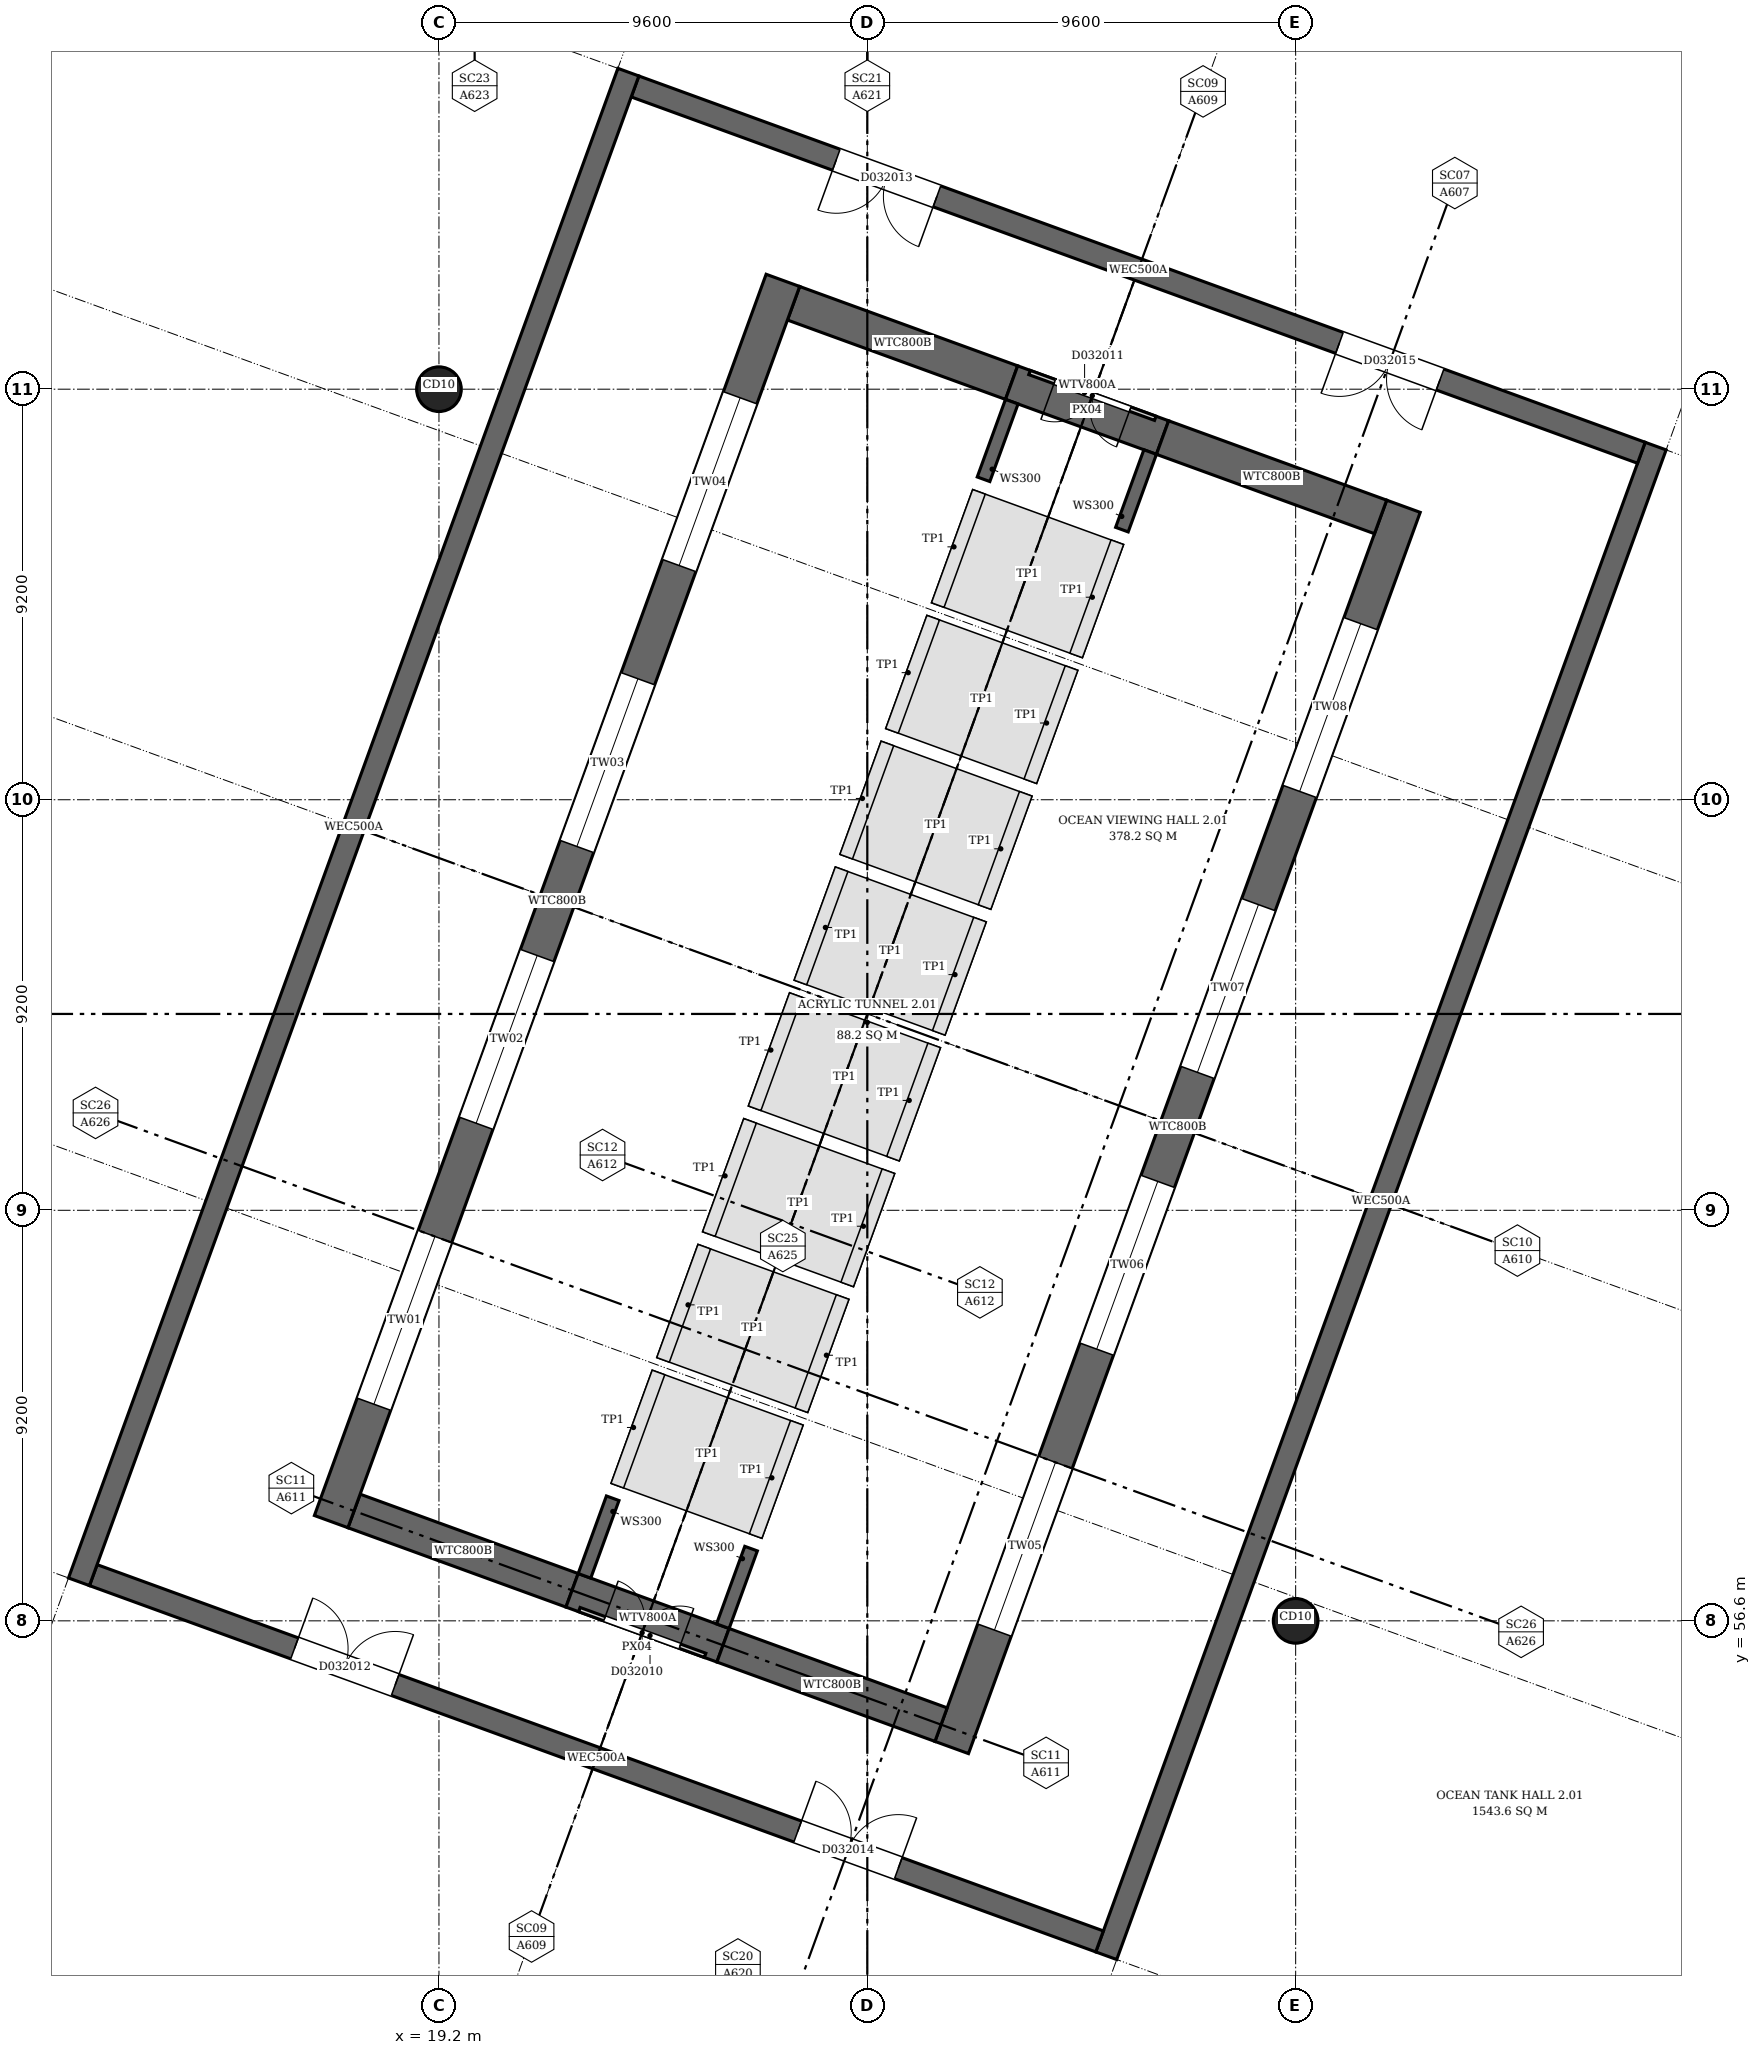
"""IFC4 building model, lengths in metres.
Left out: names, types, materials, properties, quantities, classifications, styles, units other than length and angle.
Written with IfcOpenShell. Run it as: python <this file> out.ifc"""

import sys

from ifc_helpers import new_model, si_unit, direction, frame, frame_2d, origin, origin_2d, place, context, subcontext, project, spatial, rectangle, circle, extrude, element, fill, save


model = new_model("IFC4")
c1 = context("Model", 3, precision=1e-05, world=origin(), true_north=direction((0.0, 1.0)))
c2 = subcontext(c1, "Body", "Model", "MODEL_VIEW")
j1 = project(units=[si_unit("LENGTHUNIT", "METRE"), si_unit("PLANEANGLEUNIT", "RADIAN")], contexts=[c1])
p1 = place(None, origin())
s1 = spatial("IfcSite", under=j1, at=p1, CompositionType="ELEMENT")
p2 = place(p1, origin())
s2 = spatial("IfcBuilding", under=s1, at=p2, CompositionType="ELEMENT")
p3 = place(p2, frame((0.0, 0.0, 14.2)))
s3 = spatial("IfcBuildingStorey", under=s2, at=p3, CompositionType="ELEMENT", Elevation=14.2)
p4 = place(p3, frame((11.132, 57.475, 0.0), z_axis=(0.0, 0.0, 1.0), x_axis=(0.342021295667, 0.939692201367, 0.0)))
e1 = element("IfcWall", 1, at=p4, inside=s3, PredefinedType="SHEAR", context=c2, shape_type="SweptSolid", body=[
    extrude(rectangle(XDim=36.0, YDim=0.5, at=frame_2d((18.0, 0.0))), origin(), (0.0, 0.0, 1.0), 7.5),
])
p5 = place(p3, frame((34.155, 49.096, 0.0), z_axis=(0.0, 0.0, 1.0), x_axis=(0.342019116079, 0.939692994673, 0.0)))
e2 = element("IfcWall", 2, at=p5, inside=s3, PredefinedType="SHEAR", context=c2, shape_type="SweptSolid", body=[
    extrude(rectangle(XDim=36.0, YDim=0.5, at=frame_2d((18.0, 0.0))), origin(), (0.0, 0.0, 1.0), 7.5),
])
p6 = place(p3, frame((11.453, 57.625, 0.0), z_axis=(0.0, 0.0, 1.0), x_axis=(0.939691804709, -0.342022385471, 0.0)))
e3 = element("IfcWall", 3, at=p6, inside=s3, PredefinedType="SHEAR", context=c2, shape_type="SweptSolid", body=[
    extrude(rectangle(XDim=24.0, YDim=0.5, at=frame_2d((12.0, 0.0))), origin(), (0.0, 0.0, 1.0), 7.5),
])
p7 = place(p6, frame((4.8, 0.0, 0.0)))
e4 = element("IfcOpeningElement", 4, at=p7, cuts=e3, PredefinedType="OPENING", context=c2, shape_type="SweptSolid", body=[
    extrude(rectangle(XDim=2.4, YDim=2.4, at=frame_2d((1.2, 1.2))), frame((0.0, 0.26, 0.0), z_axis=(0.0, -1.0, 0.0), x_axis=(1.0, 0.0, 0.0)), (0.0, 0.0, 1.0), 0.52),
])
p8 = place(p6, frame((16.8, 0.0, 0.0)))
e5 = element("IfcOpeningElement", 5, at=p8, cuts=e3, PredefinedType="OPENING", context=c2, shape_type="SweptSolid", body=[
    extrude(rectangle(XDim=2.4, YDim=2.4, at=frame_2d((1.2, 1.2))), frame((0.0, 0.26, 0.0), z_axis=(0.0, -1.0, 0.0), x_axis=(1.0, 0.0, 0.0)), (0.0, 0.0, 1.0), 0.52),
])
p9 = place(p3, frame((23.594, 90.984, 0.0), z_axis=(0.0, 0.0, 1.0), x_axis=(0.939692994673, -0.342019116079, 0.0)))
e6 = element("IfcWall", 6, at=p9, inside=s3, PredefinedType="SHEAR", context=c2, shape_type="SweptSolid", body=[
    extrude(rectangle(XDim=24.0, YDim=0.5, at=frame_2d((12.0, 0.0))), origin(), (0.0, 0.0, 1.0), 7.5),
])
p10 = place(p9, frame((4.8, 0.0, 0.0)))
e7 = element("IfcOpeningElement", 7, at=p10, cuts=e6, PredefinedType="OPENING", context=c2, shape_type="SweptSolid", body=[
    extrude(rectangle(XDim=2.4, YDim=2.4, at=frame_2d((1.2, 1.2))), frame((0.0, 0.26, 0.0), z_axis=(0.0, -1.0, 0.0), x_axis=(1.0, 0.0, 0.0)), (0.0, 0.0, 1.0), 0.52),
])
p11 = place(p9, frame((16.8, 0.0, 0.0)))
e8 = element("IfcOpeningElement", 8, at=p11, cuts=e6, PredefinedType="OPENING", context=c2, shape_type="SweptSolid", body=[
    extrude(rectangle(XDim=2.4, YDim=2.4, at=frame_2d((1.2, 1.2))), frame((0.0, 0.26, 0.0), z_axis=(0.0, -1.0, 0.0), x_axis=(1.0, 0.0, 0.0)), (0.0, 0.0, 1.0), 0.52),
])
p12 = place(p3, frame((16.784, 58.823, 0.0), z_axis=(0.0, 0.0, 1.0), x_axis=(0.342019205328, 0.939692962188, 0.0)))
e9 = element("IfcWall", 9, at=p12, inside=s3, PredefinedType="SOLIDWALL", context=c2, shape_type="SweptSolid", body=[
    extrude(rectangle(XDim=29.6, YDim=0.8, at=frame_2d((14.8, 0.0))), origin(), (0.0, 0.0, 1.0), 7.5),
])
p13 = place(p12, frame((2.8, 0.0, 0.6)))
e10 = element("IfcOpeningElement", 10, at=p13, cuts=e9, PredefinedType="OPENING", context=c2, shape_type="SweptSolid", body=[
    extrude(rectangle(XDim=4.0, YDim=3.0, at=frame_2d((2.0, 1.5))), frame((0.0, 0.41, 0.0), z_axis=(0.0, -1.0, 0.0), x_axis=(1.0, 0.0, 0.0)), (0.0, 0.0, 1.0), 0.82),
])
p14 = place(p12, frame((9.5, 0.0, 0.6)))
e11 = element("IfcOpeningElement", 11, at=p14, cuts=e9, PredefinedType="OPENING", context=c2, shape_type="SweptSolid", body=[
    extrude(rectangle(XDim=4.0, YDim=3.0, at=frame_2d((2.0, 1.5))), frame((0.0, 0.41, 0.0), z_axis=(0.0, -1.0, 0.0), x_axis=(1.0, 0.0, 0.0)), (0.0, 0.0, 1.0), 0.82),
])
p15 = place(p12, frame((16.1, 0.0, 0.6)))
e12 = element("IfcOpeningElement", 12, at=p15, cuts=e9, PredefinedType="OPENING", context=c2, shape_type="SweptSolid", body=[
    extrude(rectangle(XDim=4.0, YDim=3.0, at=frame_2d((2.0, 1.5))), frame((0.0, 0.41, 0.0), z_axis=(0.0, -1.0, 0.0), x_axis=(1.0, 0.0, 0.0)), (0.0, 0.0, 1.0), 0.82),
])
p16 = place(p12, frame((22.8, 0.0, 0.6)))
e13 = element("IfcOpeningElement", 13, at=p16, cuts=e9, PredefinedType="OPENING", context=c2, shape_type="SweptSolid", body=[
    extrude(rectangle(XDim=4.0, YDim=3.0, at=frame_2d((2.0, 1.5))), frame((0.0, 0.41, 0.0), z_axis=(0.0, -1.0, 0.0), x_axis=(1.0, 0.0, 0.0)), (0.0, 0.0, 1.0), 0.82),
])
p17 = place(p3, frame((30.692, 53.762, 0.0), z_axis=(0.0, 0.0, 1.0), x_axis=(0.342021856193, 0.939691997352, 0.0)))
e14 = element("IfcWall", 14, at=p17, inside=s3, PredefinedType="SOLIDWALL", context=c2, shape_type="SweptSolid", body=[
    extrude(rectangle(XDim=29.6, YDim=0.8, at=frame_2d((14.8, 0.0))), origin(), (0.0, 0.0, 1.0), 7.5),
])
p18 = place(p17, frame((2.8, 0.0, 0.6)))
e15 = element("IfcOpeningElement", 15, at=p18, cuts=e14, PredefinedType="OPENING", context=c2, shape_type="SweptSolid", body=[
    extrude(rectangle(XDim=4.0, YDim=3.0, at=frame_2d((2.0, 1.5))), frame((0.0, 0.41, 0.0), z_axis=(0.0, -1.0, 0.0), x_axis=(1.0, 0.0, 0.0)), (0.0, 0.0, 1.0), 0.82),
])
p19 = place(p17, frame((9.5, 0.0, 0.6)))
e16 = element("IfcOpeningElement", 16, at=p19, cuts=e14, PredefinedType="OPENING", context=c2, shape_type="SweptSolid", body=[
    extrude(rectangle(XDim=4.0, YDim=3.0, at=frame_2d((2.0, 1.5))), frame((0.0, 0.41, 0.0), z_axis=(0.0, -1.0, 0.0), x_axis=(1.0, 0.0, 0.0)), (0.0, 0.0, 1.0), 0.82),
])
p20 = place(p17, frame((16.1, 0.0, 0.6)))
e17 = element("IfcOpeningElement", 17, at=p20, cuts=e14, PredefinedType="OPENING", context=c2, shape_type="SweptSolid", body=[
    extrude(rectangle(XDim=4.0, YDim=3.0, at=frame_2d((2.0, 1.5))), frame((0.0, 0.41, 0.0), z_axis=(0.0, -1.0, 0.0), x_axis=(1.0, 0.0, 0.0)), (0.0, 0.0, 1.0), 0.82),
])
p21 = place(p17, frame((22.8, 0.0, 0.6)))
e18 = element("IfcOpeningElement", 18, at=p21, cuts=e14, PredefinedType="OPENING", context=c2, shape_type="SweptSolid", body=[
    extrude(rectangle(XDim=4.0, YDim=3.0, at=frame_2d((2.0, 1.5))), frame((0.0, 0.41, 0.0), z_axis=(0.0, -1.0, 0.0), x_axis=(1.0, 0.0, 0.0)), (0.0, 0.0, 1.0), 0.82),
])
p22 = place(p3, frame((17.297, 59.062, 0.0), z_axis=(0.0, 0.0, 1.0), x_axis=(0.939700169674, -0.341999402214, 0.0)))
e19 = element("IfcWall", 19, at=p22, inside=s3, PredefinedType="SOLIDWALL", context=c2, shape_type="SweptSolid", body=[
    extrude(rectangle(XDim=5.2, YDim=0.8, at=frame_2d((2.6, 0.0))), origin(), (0.0, 0.0, 1.0), 7.5),
])
p23 = place(p3, frame((25.566, 56.053, 0.0), z_axis=(0.0, 0.0, 1.0), x_axis=(0.939685079668, -0.342040861666, 0.0)))
e20 = element("IfcWall", 20, at=p23, inside=s3, PredefinedType="SOLIDWALL", context=c2, shape_type="SweptSolid", body=[
    extrude(rectangle(XDim=5.2, YDim=0.8, at=frame_2d((2.6, 0.0))), origin(), (0.0, 0.0, 1.0), 7.5),
])
p24 = place(p3, frame((22.183, 57.284, 2.9), z_axis=(0.0, 0.0, 1.0), x_axis=(0.93968249756, -0.342047955379, 0.0)))
e21 = element("IfcWall", 21, at=p24, inside=s3, PredefinedType="SOLIDWALL", context=c2, shape_type="SweptSolid", body=[
    extrude(rectangle(XDim=3.6, YDim=0.8, at=frame_2d((1.8, 0.0))), origin(), (0.0, 0.0, 1.0), 4.6),
])
for number, where, z_axis, x_axis in (
    (22, (27.147, 86.126, 0.0), (0.0, 0.0, 1.0), (0.94, -0.342, 0.0)),
    (23, (35.417, 83.116, 0.0), (0.0, 0.0, 1.0), (0.94, -0.342, 0.0)),
):
    element("IfcWall", number, at=place(p3, frame(where, z_axis=z_axis, x_axis=x_axis)), inside=s3, PredefinedType="SOLIDWALL", context=c2, shape_type="SweptSolid", body=[
        extrude(rectangle(XDim=5.2, YDim=0.8, at=frame_2d((2.6, 0.0))), origin(), (0.0, 0.0, 1.0), 7.5),
    ])
p25 = place(p3, frame((32.034, 84.347, 2.9), z_axis=(0.0, 0.0, 1.0), x_axis=(0.939696360271, -0.342009868999, 0.0)))
e24 = element("IfcWall", 24, at=p25, inside=s3, PredefinedType="SOLIDWALL", context=c2, shape_type="SweptSolid", body=[
    extrude(rectangle(XDim=3.6, YDim=0.8, at=frame_2d((1.8, 0.0))), origin(), (0.0, 0.0, 1.0), 4.6),
])
for number, where, z_axis, x_axis in (
    (25, (38.4, 56.6, 0.0), (0.0, 0.0, 1.0), (1.0, 0.0, 0.0)),
    (26, (19.2, 84.2, 0.0), (0.0, 0.0, 1.0), (1.0, 0.0, 0.0)),
):
    element("IfcColumn", number, at=place(p3, frame(where, z_axis=z_axis, x_axis=x_axis)), inside=s3, PredefinedType="COLUMN", context=c2, shape_type="SweptSolid", body=[
        extrude(circle(Radius=0.5, at=origin_2d()), origin(), (0.0, 0.0, 1.0), 7.5),
    ])
for number, where, z_axis, x_axis in (
    (27, (23.094, 59.347, 0.0), (0.0, 0.0, 1.0), (-0.342, -0.94, 0.0)),
    (28, (26.195, 58.219, 0.0), (0.0, 0.0, 1.0), (-0.342, -0.94, 0.0)),
):
    element("IfcWall", number, at=place(p3, frame(where, z_axis=z_axis, x_axis=x_axis)), inside=s3, PredefinedType="SHEAR", context=c2, shape_type="SweptSolid", body=[
        extrude(rectangle(XDim=1.85, YDim=0.3, at=frame_2d((0.925, 0.0))), origin(), (0.0, 0.0, 1.0), 2.6),
    ])
for number, where, z_axis, x_axis in (
    (29, (31.405, 82.182, 0.0), (0.0, 0.0, 1.0), (0.342, 0.94, 0.0)),
    (30, (34.506, 81.053, 0.0), (0.0, 0.0, 1.0), (0.342, 0.94, 0.0)),
):
    element("IfcWall", number, at=place(p3, frame(where, z_axis=z_axis, x_axis=x_axis)), inside=s3, PredefinedType="SHEAR", context=c2, shape_type="SweptSolid", body=[
        extrude(rectangle(XDim=1.85, YDim=0.3, at=frame_2d((0.925, 0.0))), origin(), (0.0, 0.0, 1.0), 2.6),
    ])
p26 = place(p3, frame((22.346, 56.853, 0.0), z_axis=(0.0, 0.0, 1.0), x_axis=(0.939686455819, -0.342037080957, 0.0)))
e31 = element("IfcWall", 31, at=p26, inside=s3, PredefinedType="PARTITIONING", context=c2, shape_type="SweptSolid", body=[
    extrude(rectangle(XDim=3.0, YDim=0.1, at=frame_2d((1.5, 0.0))), origin(), (0.0, 0.0, 1.0), 2.6),
])
p27 = place(p26, frame((0.6, 0.0, 0.0)))
e32 = element("IfcOpeningElement", 32, at=p27, cuts=e31, PredefinedType="OPENING", context=c2, shape_type="SweptSolid", body=[
    extrude(rectangle(XDim=1.8, YDim=2.1, at=frame_2d((0.9, 1.05))), frame((0.0, 0.06, 0.0), z_axis=(0.0, -1.0, 0.0), x_axis=(1.0, 0.0, 0.0)), (0.0, 0.0, 1.0), 0.12),
])
p28 = place(p3, frame((32.435, 84.573, 0.0), z_axis=(0.0, 0.0, 1.0), x_axis=(0.939686455819, -0.342037080957, 0.0)))
e33 = element("IfcWall", 33, at=p28, inside=s3, PredefinedType="PARTITIONING", context=c2, shape_type="SweptSolid", body=[
    extrude(rectangle(XDim=3.0, YDim=0.1, at=frame_2d((1.5, 0.0))), origin(), (0.0, 0.0, 1.0), 2.6),
])
p29 = place(p28, frame((0.6, 0.0, 0.0)))
e34 = element("IfcOpeningElement", 34, at=p29, cuts=e33, PredefinedType="OPENING", context=c2, shape_type="SweptSolid", body=[
    extrude(rectangle(XDim=1.8, YDim=2.1, at=frame_2d((0.9, 1.05))), frame((0.0, 0.06, 0.0), z_axis=(0.0, -1.0, 0.0), x_axis=(1.0, 0.0, 0.0)), (0.0, 0.0, 1.0), 0.12),
])
p30 = place(p13, origin())
e35 = element("IfcWindow", 35, at=p30, inside=s3, PartitioningType="SINGLE_PANEL", PredefinedType="WINDOW", context=c2, shape_type="SweptSolid", body=[
    extrude(rectangle(XDim=4.0, YDim=3.0, at=frame_2d((2.0, 1.5))), frame((0.0, 0.15, 0.0), z_axis=(0.0, -1.0, 0.0), x_axis=(1.0, 0.0, 0.0)), (0.0, 0.0, 1.0), 0.3),
])
fill(e10, e35)
p31 = place(p14, origin())
e36 = element("IfcWindow", 36, at=p31, inside=s3, PartitioningType="SINGLE_PANEL", PredefinedType="WINDOW", context=c2, shape_type="SweptSolid", body=[
    extrude(rectangle(XDim=4.0, YDim=3.0, at=frame_2d((2.0, 1.5))), frame((0.0, 0.15, 0.0), z_axis=(0.0, -1.0, 0.0), x_axis=(1.0, 0.0, 0.0)), (0.0, 0.0, 1.0), 0.3),
])
fill(e11, e36)
p32 = place(p15, origin())
e37 = element("IfcWindow", 37, at=p32, inside=s3, PartitioningType="SINGLE_PANEL", PredefinedType="WINDOW", context=c2, shape_type="SweptSolid", body=[
    extrude(rectangle(XDim=4.0, YDim=3.0, at=frame_2d((2.0, 1.5))), frame((0.0, 0.15, 0.0), z_axis=(0.0, -1.0, 0.0), x_axis=(1.0, 0.0, 0.0)), (0.0, 0.0, 1.0), 0.3),
])
fill(e12, e37)
p33 = place(p16, origin())
e38 = element("IfcWindow", 38, at=p33, inside=s3, PartitioningType="SINGLE_PANEL", PredefinedType="WINDOW", context=c2, shape_type="SweptSolid", body=[
    extrude(rectangle(XDim=4.0, YDim=3.0, at=frame_2d((2.0, 1.5))), frame((0.0, 0.15, 0.0), z_axis=(0.0, -1.0, 0.0), x_axis=(1.0, 0.0, 0.0)), (0.0, 0.0, 1.0), 0.3),
])
fill(e13, e38)
p34 = place(p18, origin())
e39 = element("IfcWindow", 39, at=p34, inside=s3, PartitioningType="SINGLE_PANEL", PredefinedType="WINDOW", context=c2, shape_type="SweptSolid", body=[
    extrude(rectangle(XDim=4.0, YDim=3.0, at=frame_2d((2.0, 1.5))), frame((0.0, 0.15, 0.0), z_axis=(0.0, -1.0, 0.0), x_axis=(1.0, 0.0, 0.0)), (0.0, 0.0, 1.0), 0.3),
])
fill(e15, e39)
p35 = place(p19, origin())
e40 = element("IfcWindow", 40, at=p35, inside=s3, PartitioningType="SINGLE_PANEL", PredefinedType="WINDOW", context=c2, shape_type="SweptSolid", body=[
    extrude(rectangle(XDim=4.0, YDim=3.0, at=frame_2d((2.0, 1.5))), frame((0.0, 0.15, 0.0), z_axis=(0.0, -1.0, 0.0), x_axis=(1.0, 0.0, 0.0)), (0.0, 0.0, 1.0), 0.3),
])
fill(e16, e40)
p36 = place(p20, origin())
e41 = element("IfcWindow", 41, at=p36, inside=s3, PartitioningType="SINGLE_PANEL", PredefinedType="WINDOW", context=c2, shape_type="SweptSolid", body=[
    extrude(rectangle(XDim=4.0, YDim=3.0, at=frame_2d((2.0, 1.5))), frame((0.0, 0.15, 0.0), z_axis=(0.0, -1.0, 0.0), x_axis=(1.0, 0.0, 0.0)), (0.0, 0.0, 1.0), 0.3),
])
fill(e17, e41)
p37 = place(p21, origin())
e42 = element("IfcWindow", 42, at=p37, inside=s3, PartitioningType="SINGLE_PANEL", PredefinedType="WINDOW", context=c2, shape_type="SweptSolid", body=[
    extrude(rectangle(XDim=4.0, YDim=3.0, at=frame_2d((2.0, 1.5))), frame((0.0, 0.15, 0.0), z_axis=(0.0, -1.0, 0.0), x_axis=(1.0, 0.0, 0.0)), (0.0, 0.0, 1.0), 0.3),
])
fill(e18, e42)
p38 = place(p27, origin())
e43 = element("IfcDoor", 43, at=p38, inside=s3, OperationType="DOUBLE_DOOR_SINGLE_SWING", PredefinedType="DOOR", context=c2, shape_type="SweptSolid", body=[
    extrude(rectangle(XDim=1.8, YDim=2.1, at=frame_2d((0.9, 1.05))), frame((0.0, 0.025, 0.0), z_axis=(0.0, -1.0, 0.0), x_axis=(1.0, 0.0, 0.0)), (0.0, 0.0, 1.0), 0.05),
])
fill(e32, e43)
p39 = place(p29, origin())
e44 = element("IfcDoor", 44, at=p39, inside=s3, OperationType="DOUBLE_DOOR_SINGLE_SWING", PredefinedType="DOOR", context=c2, shape_type="SweptSolid", body=[
    extrude(rectangle(XDim=1.8, YDim=2.1, at=frame_2d((0.9, 1.05))), frame((0.0, 0.025, 0.0), z_axis=(0.0, -1.0, 0.0), x_axis=(1.0, 0.0, 0.0)), (0.0, 0.0, 1.0), 0.05),
])
fill(e34, e44)
p40 = place(p7, origin())
e45 = element("IfcDoor", 45, at=p40, inside=s3, OperationType="DOUBLE_DOOR_SINGLE_SWING", PredefinedType="DOOR", context=c2, shape_type="SweptSolid", body=[
    extrude(rectangle(XDim=2.4, YDim=2.4, at=frame_2d((1.2, 1.2))), frame((0.0, 0.025, 0.0), z_axis=(0.0, -1.0, 0.0), x_axis=(1.0, 0.0, 0.0)), (0.0, 0.0, 1.0), 0.05),
])
fill(e4, e45)
p41 = place(p10, origin())
e46 = element("IfcDoor", 46, at=p41, inside=s3, OperationType="DOUBLE_DOOR_SINGLE_SWING", PredefinedType="DOOR", context=c2, shape_type="SweptSolid", body=[
    extrude(rectangle(XDim=2.4, YDim=2.4, at=frame_2d((1.2, 1.2))), frame((0.0, 0.025, 0.0), z_axis=(0.0, -1.0, 0.0), x_axis=(1.0, 0.0, 0.0)), (0.0, 0.0, 1.0), 0.05),
])
fill(e7, e46)
p42 = place(p8, origin())
e47 = element("IfcDoor", 47, at=p42, inside=s3, OperationType="DOUBLE_DOOR_SINGLE_SWING", PredefinedType="DOOR", context=c2, shape_type="SweptSolid", body=[
    extrude(rectangle(XDim=2.4, YDim=2.4, at=frame_2d((1.2, 1.2))), frame((0.0, 0.025, 0.0), z_axis=(0.0, -1.0, 0.0), x_axis=(1.0, 0.0, 0.0)), (0.0, 0.0, 1.0), 0.05),
])
fill(e5, e47)
p43 = place(p11, origin())
e48 = element("IfcDoor", 48, at=p43, inside=s3, OperationType="DOUBLE_DOOR_SINGLE_SWING", PredefinedType="DOOR", context=c2, shape_type="SweptSolid", body=[
    extrude(rectangle(XDim=2.4, YDim=2.4, at=frame_2d((1.2, 1.2))), frame((0.0, 0.025, 0.0), z_axis=(0.0, -1.0, 0.0), x_axis=(1.0, 0.0, 0.0)), (0.0, 0.0, 1.0), 0.05),
])
fill(e8, e48)
save(model, sys.argv[1])
